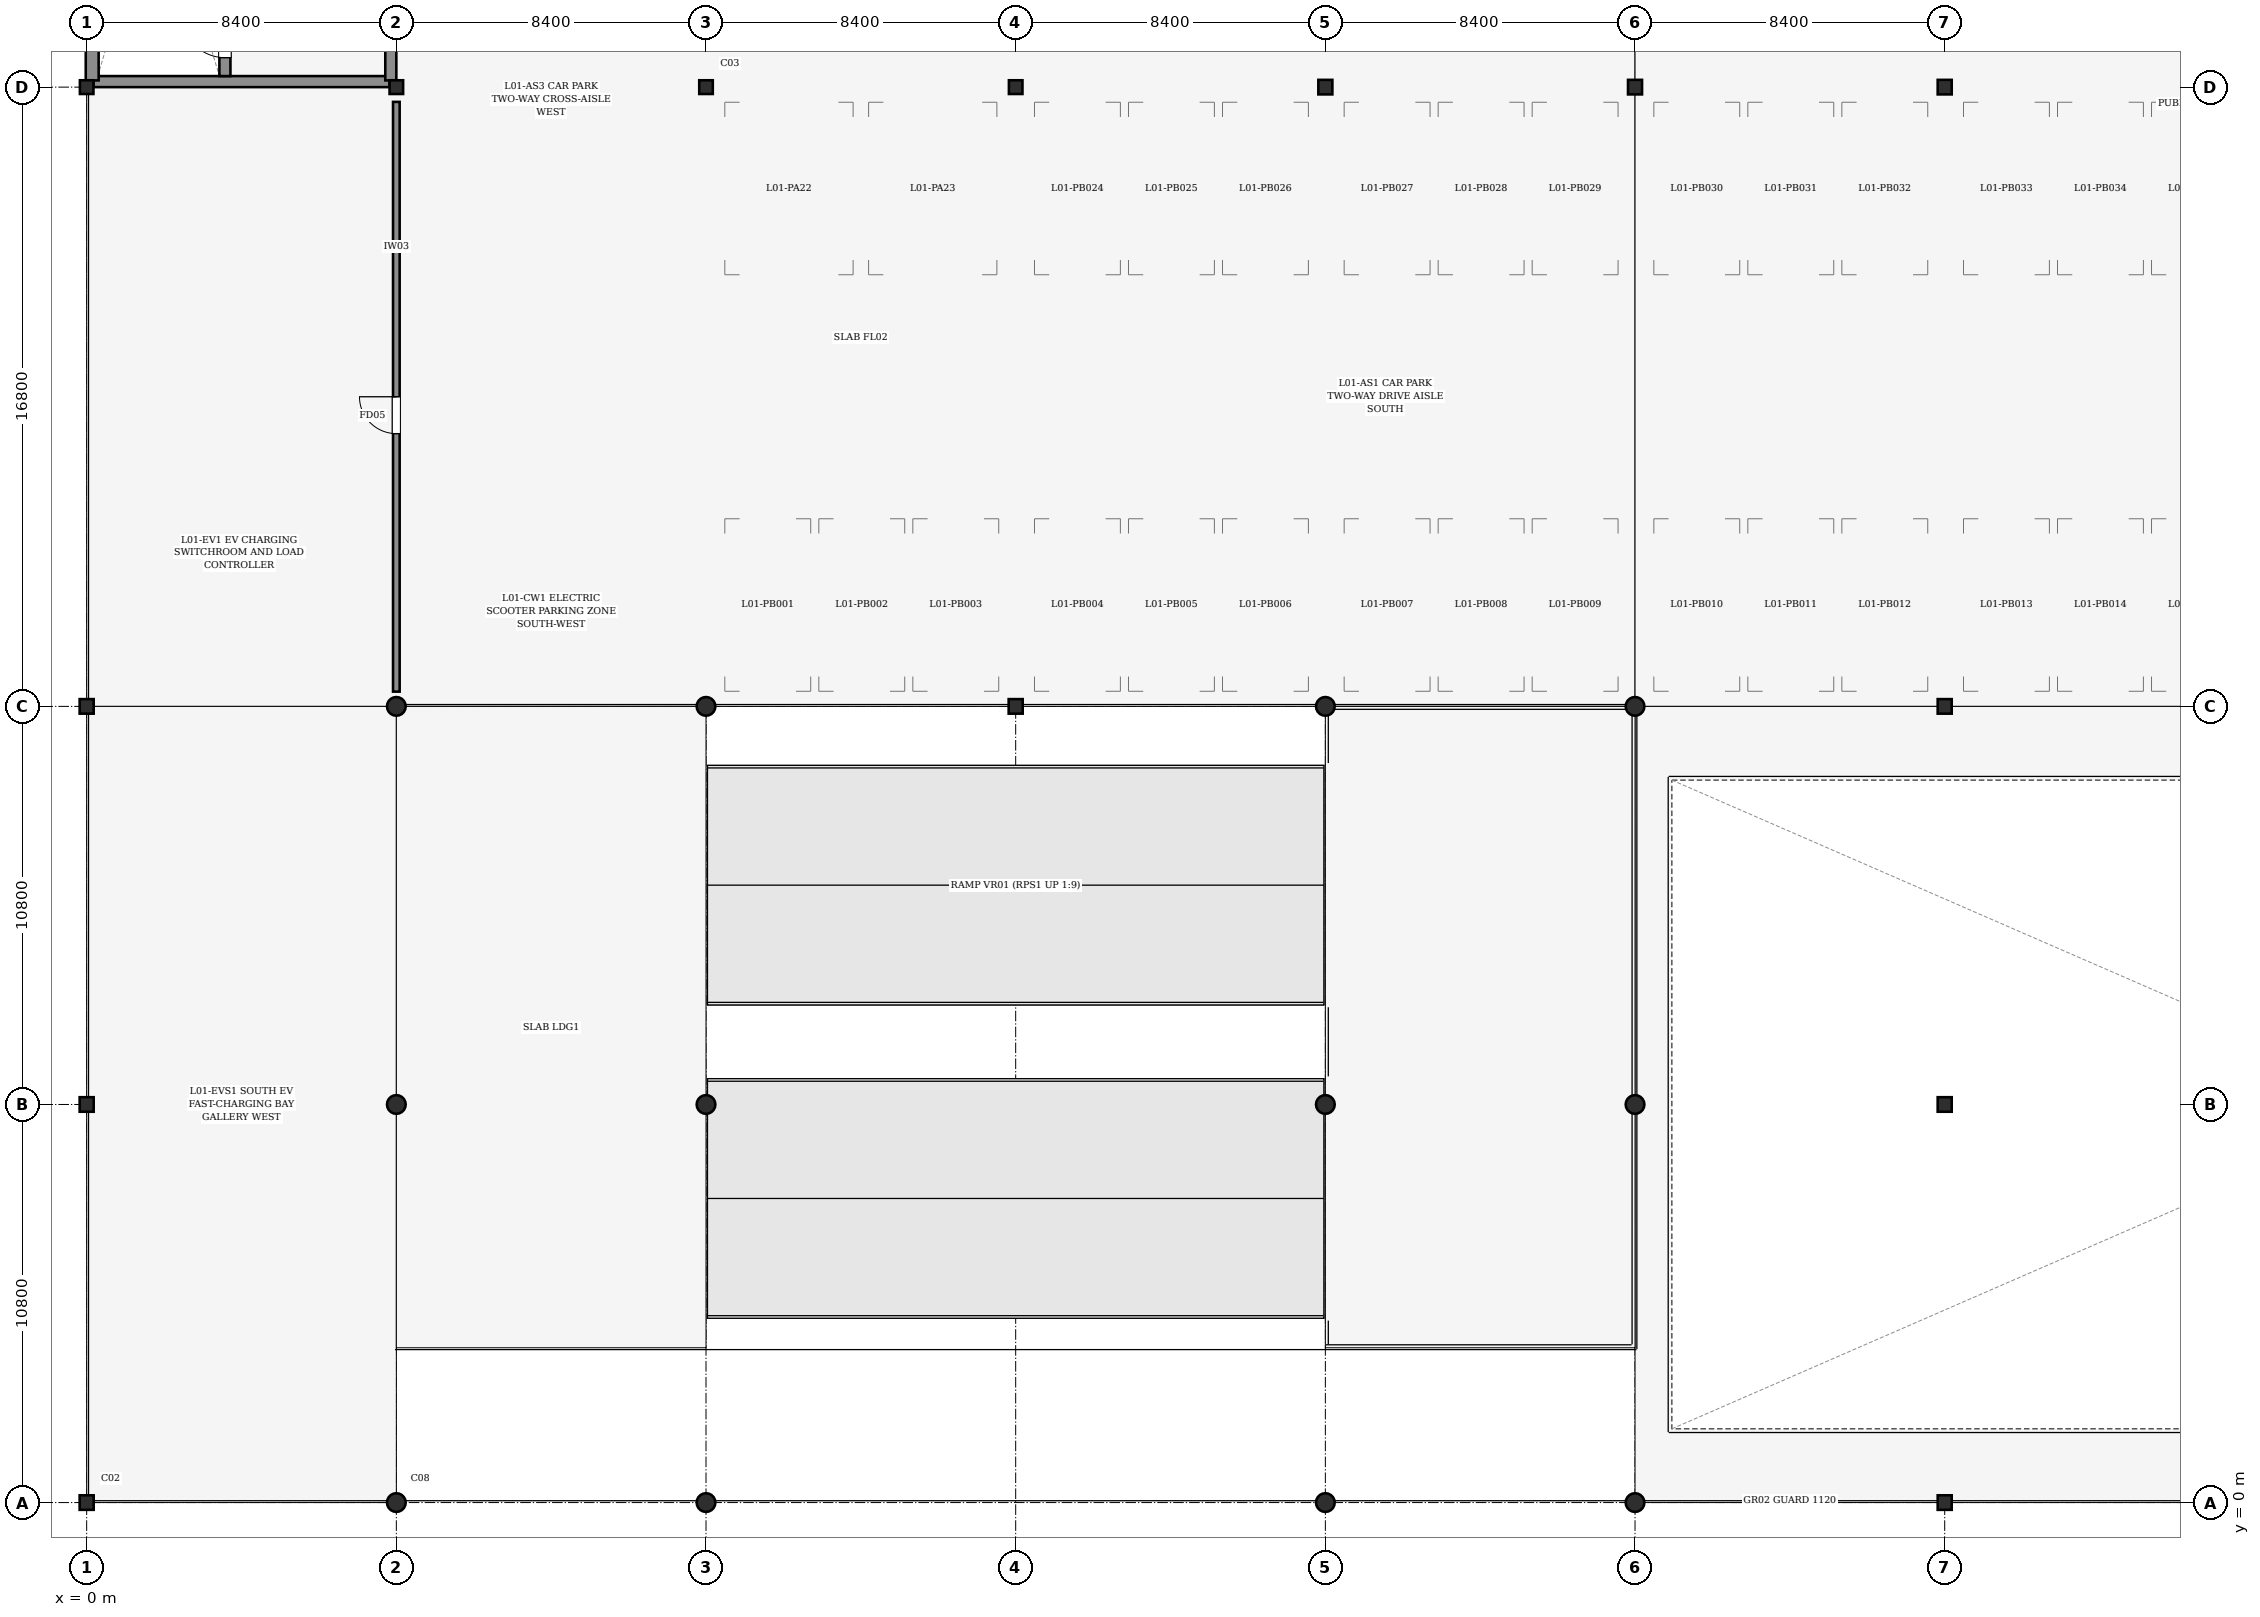
"""IFC4 building model, lengths in metres.
Left out: names, types, materials, properties, quantities, classifications, styles, units other than length and angle.
Written with IfcOpenShell. Run it as: python <this file> out.ifc"""

import sys

from ifc_helpers import new_model, si_unit, direction, frame, frame_2d, origin, origin_2d, place, context, subcontext, project, spatial, rectangle, hollow_circle, i_section, extrude, element, fill, save


model = new_model("IFC4")
c1 = context("Model", 3, precision=1e-05, world=origin(), true_north=direction((0.0, 1.0)))
c2 = subcontext(c1, "Body", "Model", "MODEL_VIEW")
j1 = project(units=[si_unit("LENGTHUNIT", "METRE"), si_unit("PLANEANGLEUNIT", "RADIAN")], contexts=[c1])
p1 = place(None, origin())
s1 = spatial("IfcSite", under=j1, at=p1, CompositionType="ELEMENT")
p2 = place(p1, origin())
s2 = spatial("IfcBuilding", under=s1, at=p2, CompositionType="ELEMENT")
p3 = place(p2, frame((0.0, 0.0, 5.4)))
s3 = spatial("IfcBuildingStorey", under=s2, at=p3, CompositionType="ELEMENT", Elevation=5.4)
for number, where, z_axis, x_axis in (
    (1, (0.0, 0.0, 0.0), (0.0, 0.0, 1.0), (1.0, 0.0, 0.0)),
    (2, (0.0, 10.8, 0.0), (0.0, 0.0, 1.0), (1.0, 0.0, 0.0)),
    (3, (0.0, 21.6, 0.0), (0.0, 0.0, 1.0), (1.0, 0.0, 0.0)),
):
    element("IfcColumn", number, at=place(p3, frame(where, z_axis=z_axis, x_axis=x_axis)), inside=s3, PredefinedType="COLUMN", context=c2, shape_type="SweptSolid", body=[
        extrude(i_section(OverallWidth=0.395, OverallDepth=0.381, WebThickness=0.018, FlangeThickness=0.03, FilletRadius=0.015, at=origin_2d()), origin(), (0.0, 0.0, 1.0), 3.6),
    ])
p4 = place(p3, frame((0.0, 38.4, 0.0), z_axis=(0.0, 0.0, 1.0), x_axis=(1.0, 0.0, 0.0)))
e4 = element("IfcColumn", 4, at=p4, inside=s3, PredefinedType="COLUMN", context=c2, shape_type="SweptSolid", body=[
    extrude(i_section(OverallWidth=0.373, OverallDepth=0.368, WebThickness=0.014, FlangeThickness=0.024, FilletRadius=0.015, at=origin_2d()), origin(), (0.0, 0.0, 1.0), 3.6),
])
for number, where, z_axis, x_axis in (
    (5, (8.4, 0.0, 0.0), (0.0, 0.0, 1.0), (1.0, 0.0, 0.0)),
    (6, (8.4, 10.8, 0.0), (0.0, 0.0, 1.0), (1.0, 0.0, 0.0)),
    (7, (8.4, 21.6, 0.0), (0.0, 0.0, 1.0), (1.0, 0.0, 0.0)),
):
    element("IfcColumn", number, at=place(p3, frame(where, z_axis=z_axis, x_axis=x_axis)), inside=s3, PredefinedType="COLUMN", context=c2, shape_type="SweptSolid", body=[
        extrude(hollow_circle(Radius=0.254, WallThickness=0.016, at=origin_2d()), origin(), (0.0, 0.0, 1.0), 3.6),
    ])
p5 = place(p3, frame((8.4, 38.4, 0.0), z_axis=(0.0, 0.0, 1.0), x_axis=(1.0, 0.0, 0.0)))
e8 = element("IfcColumn", 8, at=p5, inside=s3, PredefinedType="COLUMN", context=c2, shape_type="SweptSolid", body=[
    extrude(i_section(OverallWidth=0.373, OverallDepth=0.368, WebThickness=0.014, FlangeThickness=0.024, FilletRadius=0.015, at=origin_2d()), origin(), (0.0, 0.0, 1.0), 3.6),
])
for number, where, z_axis, x_axis in (
    (9, (16.8, 0.0, 0.0), (0.0, 0.0, 1.0), (1.0, 0.0, 0.0)),
    (10, (16.8, 10.8, 0.0), (0.0, 0.0, 1.0), (1.0, 0.0, 0.0)),
    (11, (16.8, 21.6, 0.0), (0.0, 0.0, 1.0), (1.0, 0.0, 0.0)),
):
    element("IfcColumn", number, at=place(p3, frame(where, z_axis=z_axis, x_axis=x_axis)), inside=s3, PredefinedType="COLUMN", context=c2, shape_type="SweptSolid", body=[
        extrude(hollow_circle(Radius=0.254, WallThickness=0.016, at=origin_2d()), origin(), (0.0, 0.0, 1.0), 3.6),
    ])
p6 = place(p3, frame((16.8, 38.4, 0.0), z_axis=(0.0, 0.0, 1.0), x_axis=(1.0, 0.0, 0.0)))
e12 = element("IfcColumn", 12, at=p6, inside=s3, PredefinedType="COLUMN", context=c2, shape_type="SweptSolid", body=[
    extrude(i_section(OverallWidth=0.373, OverallDepth=0.368, WebThickness=0.014, FlangeThickness=0.024, FilletRadius=0.015, at=origin_2d()), origin(), (0.0, 0.0, 1.0), 3.6),
])
p7 = place(p3, frame((25.2, 21.6, 0.0), z_axis=(0.0, 0.0, 1.0), x_axis=(1.0, 0.0, 0.0)))
e13 = element("IfcColumn", 13, at=p7, inside=s3, PredefinedType="COLUMN", context=c2, shape_type="SweptSolid", body=[
    extrude(i_section(OverallWidth=0.395, OverallDepth=0.381, WebThickness=0.018, FlangeThickness=0.03, FilletRadius=0.015, at=origin_2d()), origin(), (0.0, 0.0, 1.0), 3.6),
])
p8 = place(p3, frame((25.2, 38.4, 0.0), z_axis=(0.0, 0.0, 1.0), x_axis=(1.0, 0.0, 0.0)))
e14 = element("IfcColumn", 14, at=p8, inside=s3, PredefinedType="COLUMN", context=c2, shape_type="SweptSolid", body=[
    extrude(i_section(OverallWidth=0.373, OverallDepth=0.368, WebThickness=0.014, FlangeThickness=0.024, FilletRadius=0.015, at=origin_2d()), origin(), (0.0, 0.0, 1.0), 3.6),
])
for number, where, z_axis, x_axis in (
    (15, (33.6, 0.0, 0.0), (0.0, 0.0, 1.0), (1.0, 0.0, 0.0)),
    (16, (33.6, 10.8, 0.0), (0.0, 0.0, 1.0), (1.0, 0.0, 0.0)),
    (17, (33.6, 21.6, 0.0), (0.0, 0.0, 1.0), (1.0, 0.0, 0.0)),
):
    element("IfcColumn", number, at=place(p3, frame(where, z_axis=z_axis, x_axis=x_axis)), inside=s3, PredefinedType="COLUMN", context=c2, shape_type="SweptSolid", body=[
        extrude(hollow_circle(Radius=0.254, WallThickness=0.016, at=origin_2d()), origin(), (0.0, 0.0, 1.0), 3.6),
    ])
p9 = place(p3, frame((33.6, 38.4, 0.0), z_axis=(0.0, 0.0, 1.0), x_axis=(1.0, 0.0, 0.0)))
e18 = element("IfcColumn", 18, at=p9, inside=s3, PredefinedType="COLUMN", context=c2, shape_type="SweptSolid", body=[
    extrude(i_section(OverallWidth=0.395, OverallDepth=0.381, WebThickness=0.018, FlangeThickness=0.03, FilletRadius=0.015, at=origin_2d()), origin(), (0.0, 0.0, 1.0), 3.6),
])
for number, where, z_axis, x_axis in (
    (19, (42.0, 0.0, 0.0), (0.0, 0.0, 1.0), (1.0, 0.0, 0.0)),
    (20, (42.0, 10.8, 0.0), (0.0, 0.0, 1.0), (1.0, 0.0, 0.0)),
    (21, (42.0, 21.6, 0.0), (0.0, 0.0, 1.0), (1.0, 0.0, 0.0)),
):
    element("IfcColumn", number, at=place(p3, frame(where, z_axis=z_axis, x_axis=x_axis)), inside=s3, PredefinedType="COLUMN", context=c2, shape_type="SweptSolid", body=[
        extrude(hollow_circle(Radius=0.254, WallThickness=0.016, at=origin_2d()), origin(), (0.0, 0.0, 1.0), 3.6),
    ])
for number, where, z_axis, x_axis in (
    (22, (42.0, 38.4, 0.0), (0.0, 0.0, 1.0), (1.0, 0.0, 0.0)),
    (23, (50.4, 0.0, 0.0), (0.0, 0.0, 1.0), (1.0, 0.0, 0.0)),
    (24, (50.4, 10.8, 0.0), (0.0, 0.0, 1.0), (1.0, 0.0, 0.0)),
    (25, (50.4, 21.6, 0.0), (0.0, 0.0, 1.0), (1.0, 0.0, 0.0)),
    (26, (50.4, 38.4, 0.0), (0.0, 0.0, 1.0), (1.0, 0.0, 0.0)),
):
    element("IfcColumn", number, at=place(p3, frame(where, z_axis=z_axis, x_axis=x_axis)), inside=s3, PredefinedType="COLUMN", context=c2, shape_type="SweptSolid", body=[
        extrude(i_section(OverallWidth=0.395, OverallDepth=0.381, WebThickness=0.018, FlangeThickness=0.03, FilletRadius=0.015, at=origin_2d()), origin(), (0.0, 0.0, 1.0), 3.6),
    ])
p10 = place(p3, frame((0.185, 38.55, 0.0), z_axis=(0.0, 0.0, 1.0), x_axis=(1.0, 0.0, 0.0)))
e27 = element("IfcWall", 27, at=p10, inside=s3, PredefinedType="SHEAR", context=c2, shape_type="SweptSolid", body=[
    extrude(rectangle(XDim=8.031, YDim=0.3, at=frame_2d((4.016, 0.0))), origin(), (0.0, 0.0, 1.0), 3.38),
])
p11 = place(p3, frame((0.15, 38.582, 0.0), z_axis=(0.0, 0.0, 1.0), x_axis=(0.0, 1.0, 0.0)))
e28 = element("IfcWall", 28, at=p11, inside=s3, PredefinedType="SHEAR", context=c2, shape_type="SweptSolid", body=[
    extrude(rectangle(XDim=16.436, YDim=0.35, at=frame_2d((8.218, 0.0))), origin(), (0.0, 0.0, 1.0), 3.38),
])
p12 = place(p3, frame((8.25, 38.582, 0.0), z_axis=(0.0, 0.0, 1.0), x_axis=(0.0, 1.0, 0.0)))
e29 = element("IfcWall", 29, at=p12, inside=s3, PredefinedType="SHEAR", context=c2, shape_type="SweptSolid", body=[
    extrude(rectangle(XDim=16.436, YDim=0.3, at=frame_2d((8.218, 0.0))), origin(), (0.0, 0.0, 1.0), 3.38),
])
p13 = place(p12, frame((5.668, 0.0, 0.0)))
e30 = element("IfcOpeningElement", 30, at=p13, cuts=e29, PredefinedType="OPENING", context=c2, shape_type="SweptSolid", body=[
    extrude(rectangle(XDim=1.3, YDim=2.2, at=frame_2d((0.65, 1.1))), frame((0.0, 0.16, 0.0), z_axis=(0.0, -1.0, 0.0), x_axis=(1.0, 0.0, 0.0)), (0.0, 0.0, 1.0), 0.32),
])
p14 = place(p3, frame((3.75, 38.7, 0.0), z_axis=(0.0, 0.0, 1.0), x_axis=(0.0, 1.0, 0.0)))
e31 = element("IfcWall", 31, at=p14, inside=s3, PredefinedType="SHEAR", context=c2, shape_type="SweptSolid", body=[
    extrude(rectangle(XDim=16.2, YDim=0.3, at=frame_2d((8.1, 0.0))), origin(), (0.0, 0.0, 1.0), 3.38),
])
p15 = place(p14, frame((0.5, 0.0, 0.0)))
e32 = element("IfcOpeningElement", 32, at=p15, cuts=e31, PredefinedType="OPENING", context=c2, shape_type="SweptSolid", body=[
    extrude(rectangle(XDim=1.15, YDim=2.15, at=frame_2d((0.575, 1.075))), frame((0.0, 0.16, 0.0), z_axis=(0.0, -1.0, 0.0), x_axis=(1.0, 0.0, 0.0)), (0.0, 0.0, 1.0), 0.32),
])
p16 = place(p3, frame((8.4, 22.0, 0.0), z_axis=(0.0, 0.0, 1.0), x_axis=(0.0, 1.0, 0.0)))
e33 = element("IfcWall", 33, at=p16, inside=s3, PredefinedType="PARTITIONING", context=c2, shape_type="SweptSolid", body=[
    extrude(rectangle(XDim=16.0, YDim=0.18, at=frame_2d((8.0, 0.0))), origin(), (0.0, 0.0, 1.0), 2.525),
])
p17 = place(p16, frame((7.0, 0.0, 0.0)))
e34 = element("IfcOpeningElement", 34, at=p17, cuts=e33, PredefinedType="OPENING", context=c2, shape_type="SweptSolid", body=[
    extrude(rectangle(XDim=1.0, YDim=2.15, at=frame_2d((0.5, 1.075))), frame((0.0, 0.1, 0.0), z_axis=(0.0, -1.0, 0.0), x_axis=(1.0, 0.0, 0.0)), (0.0, 0.0, 1.0), 0.2),
])
p18 = place(p15, frame((1.15, 0.0, 0.0), z_axis=(0.0, 0.0, 1.0), x_axis=(-1.0, 0.0, 0.0)))
e35 = element("IfcDoor", 35, at=p18, inside=s3, OperationType="SINGLE_SWING_LEFT", PredefinedType="DOOR", context=c2, shape_type="SweptSolid", body=[
    extrude(rectangle(XDim=1.15, YDim=2.15, at=frame_2d((0.575, 1.075))), frame((0.0, 0.025, 0.0), z_axis=(0.0, -1.0, 0.0), x_axis=(1.0, 0.0, 0.0)), (0.0, 0.0, 1.0), 0.05),
])
fill(e32, e35)
p19 = place(p17, origin())
e36 = element("IfcDoor", 36, at=p19, inside=s3, OperationType="SINGLE_SWING_RIGHT", PredefinedType="DOOR", context=c2, shape_type="SweptSolid", body=[
    extrude(rectangle(XDim=1.0, YDim=2.15, at=frame_2d((0.5, 1.075))), frame((0.0, 0.025, 0.0), z_axis=(0.0, -1.0, 0.0), x_axis=(1.0, 0.0, 0.0)), (0.0, 0.0, 1.0), 0.05),
])
fill(e34, e36)
save(model, sys.argv[1])
